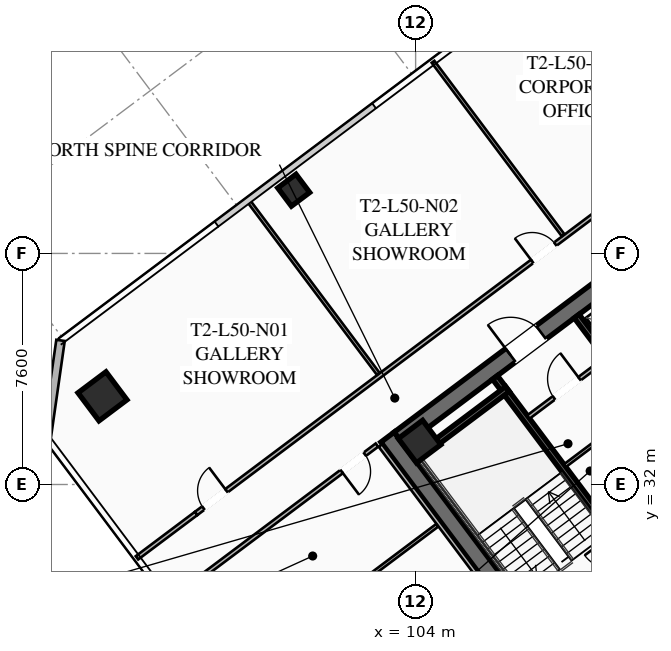
"""IFC4 building model, lengths in metres.
Left out: names, types, materials, properties, quantities, classifications, styles, units other than length and angle.
Written with IfcOpenShell. Run it as: python <this file> out.ifc"""

import sys

from ifc_helpers import new_model, si_unit, direction, frame, frame_2d, origin, origin_2d, place, context, subcontext, project, spatial, rectangle, hollow_rectangle, extrude, element, fill, save


model = new_model("IFC4")
c1 = context("Model", 3, precision=1e-05, world=origin(), true_north=direction((0.0, 1.0)))
c2 = subcontext(c1, "Body", "Model", "MODEL_VIEW")
j1 = project(units=[si_unit("LENGTHUNIT", "METRE"), si_unit("PLANEANGLEUNIT", "RADIAN")], contexts=[c1])
p1 = place(None, origin())
s1 = spatial("IfcSite", under=j1, at=p1, CompositionType="ELEMENT")
p2 = place(p1, origin())
s2 = spatial("IfcBuilding", under=s1, at=p2, CompositionType="ELEMENT")
p3 = place(p2, frame((0.0, 0.0, 185.4)))
s3 = spatial("IfcBuildingStorey", under=s2, at=p3, CompositionType="ELEMENT", Elevation=185.4)
p4 = place(p3, frame((112.436, 21.077, 0.0), z_axis=(0.0, 0.0, 1.0), x_axis=(-0.600005007985, 0.799996243986, 0.0)))
e1 = element("IfcWall", 1, at=p4, inside=s3, PredefinedType="SHEAR", context=c2, shape_type="SweptSolid", body=[
    extrude(rectangle(XDim=15.6, YDim=0.55, at=frame_2d((7.8, 0.0))), origin(), (0.0, 0.0, 1.0), 3.55),
])
p5 = place(p3, frame((103.461, 33.502, 0.0), z_axis=(0.0, 0.0, 1.0), x_axis=(0.799998054672, 0.600002593761, 0.0)))
e2 = element("IfcWall", 2, at=p5, inside=s3, PredefinedType="SHEAR", context=c2, shape_type="SweptSolid", body=[
    extrude(rectangle(XDim=15.06, YDim=0.55, at=frame_2d((7.53, 0.0))), origin(), (0.0, 0.0, 1.0), 3.55),
])
p6 = place(p5, frame((4.58, 0.0, 0.0)))
e3 = element("IfcOpeningElement", 3, at=p6, cuts=e2, PredefinedType="OPENING", context=c2, shape_type="SweptSolid", body=[
    extrude(rectangle(XDim=1.25, YDim=2.25, at=frame_2d((0.625, 1.125))), frame((0.0, 0.285, 0.0), z_axis=(0.0, -1.0, 0.0), x_axis=(1.0, 0.0, 0.0)), (0.0, 0.0, 1.0), 0.57),
])
p7 = place(p5, frame((9.63, 0.0, 0.0)))
e4 = element("IfcOpeningElement", 4, at=p7, cuts=e2, PredefinedType="OPENING", context=c2, shape_type="SweptSolid", body=[
    extrude(rectangle(XDim=1.25, YDim=2.25, at=frame_2d((0.625, 1.125))), frame((0.0, 0.285, 0.0), z_axis=(0.0, -1.0, 0.0), x_axis=(1.0, 0.0, 0.0)), (0.0, 0.0, 1.0), 0.57),
])
p8 = place(p3, frame((104.13, 33.41, 0.0), z_axis=(0.0, 0.0, 1.0), x_axis=(0.799999996291, 0.600000004945, 0.0)))
e5 = element("IfcColumn", 5, at=p8, inside=s3, PredefinedType="COLUMN", context=c2, shape_type="SweptSolid", body=[
    extrude(hollow_rectangle(XDim=1.0, YDim=1.0, WallThickness=0.04, at=origin_2d()), origin(), (0.0, 0.0, 1.0), 3.37),
])
p9 = place(p3, frame((93.7, 34.9, 0.0), z_axis=(0.0, 0.0, 1.0), x_axis=(0.799999996291, 0.600000004945, 0.0)))
e6 = element("IfcColumn", 6, at=p9, inside=s3, PredefinedType="COLUMN", context=c2, shape_type="SweptSolid", body=[
    extrude(hollow_rectangle(XDim=1.15, YDim=1.15, WallThickness=0.045, at=origin_2d()), origin(), (0.0, 0.0, 1.0), 3.37),
])
p10 = place(p3, frame((99.99, 41.68, 0.0), z_axis=(0.0, 0.0, 1.0), x_axis=(0.799999996291, 0.600000004945, 0.0)))
e7 = element("IfcColumn", 7, at=p10, inside=s3, PredefinedType="COLUMN", context=c2, shape_type="SweptSolid", body=[
    extrude(hollow_rectangle(XDim=0.75, YDim=0.75, WallThickness=0.032, at=origin_2d()), origin(), (0.0, 0.0, 1.0), 3.37),
])
p11 = place(p3, frame((91.86, 33.52, 0.0), z_axis=(0.0, 0.0, 1.0), x_axis=(0.141410847992, 0.989950994782, 0.0)))
e8 = element("IfcWall", 8, at=p11, inside=s3, PredefinedType="SOLIDWALL", context=c2, shape_type="SweptSolid", body=[
    extrude(rectangle(XDim=3.253, YDim=0.28, at=frame_2d((1.626, 0.0))), origin(), (0.0, 0.0, 1.0), 3.37),
])
p12 = place(p3, frame((111.44, 29.08, 0.0), z_axis=(0.0, 0.0, 1.0), x_axis=(-0.59999029481, 0.8000072788, 0.0)))
e9 = element("IfcWall", 9, at=p12, inside=s3, PredefinedType="SHEAR", context=c2, shape_type="SweptSolid", body=[
    extrude(rectangle(XDim=8.05, YDim=0.2, at=frame_2d((4.025, 0.0))), origin(), (0.0, 0.0, 1.0), 3.37),
])
p13 = place(p12, frame((0.45, 0.0, 0.0)))
e10 = element("IfcOpeningElement", 10, at=p13, cuts=e9, PredefinedType="OPENING", context=c2, shape_type="SweptSolid", body=[
    extrude(rectangle(XDim=1.15, YDim=2.2, at=frame_2d((0.575, 1.1))), frame((0.0, 0.11, 0.0), z_axis=(0.0, -1.0, 0.0), x_axis=(1.0, 0.0, 0.0)), (0.0, 0.0, 1.0), 0.22),
])
for number, where, z_axis, x_axis in (
    (11, (108.396, 26.922, 0.0), (0.0, 0.0, 1.0), (0.8, 0.6, 0.0)),
    (12, (103.956, 32.842, 0.0), (0.0, 0.0, 1.0), (0.8, 0.6, 0.0)),
):
    element("IfcWall", number, at=place(p3, frame(where, z_axis=z_axis, x_axis=x_axis)), inside=s3, PredefinedType="SHEAR", context=c2, shape_type="SweptSolid", body=[
        extrude(rectangle(XDim=3.83, YDim=0.2, at=frame_2d((1.915, 0.0))), origin(), (0.0, 0.0, 1.0), 3.37),
    ])
p14 = place(p3, frame((117.998, 25.936, 0.0), z_axis=(0.0, 0.0, 1.0), x_axis=(-0.600002693989, 0.799997979501, 0.0)))
e13 = element("IfcWall", 13, at=p14, inside=s3, PredefinedType="SHEAR", context=c2, shape_type="SweptSolid", body=[
    extrude(rectangle(XDim=14.5, YDim=0.2, at=frame_2d((7.25, 0.0))), origin(), (0.0, 0.0, 1.0), 3.37),
])
p15 = place(p3, frame((107.71, 34.22, 0.0), z_axis=(0.0, 0.0, 1.0), x_axis=(0.799981399002, 0.60002480053, 0.0)))
e14 = element("IfcWall", 14, at=p15, inside=s3, PredefinedType="PARTITIONING", context=c2, shape_type="SweptSolid", body=[
    extrude(rectangle(XDim=3.15, YDim=0.135, at=frame_2d((1.575, 0.0))), origin(), (0.0, 0.0, 1.0), 2.723),
])
p16 = place(p15, frame((1.05, 0.0, 0.0)))
e15 = element("IfcOpeningElement", 15, at=p16, cuts=e14, PredefinedType="OPENING", context=c2, shape_type="SweptSolid", body=[
    extrude(rectangle(XDim=1.05, YDim=2.2, at=frame_2d((0.525, 1.1))), frame((0.0, 0.077, 0.0), z_axis=(0.0, -1.0, 0.0), x_axis=(1.0, 0.0, 0.0)), (0.0, 0.0, 1.0), 0.155),
])
p17 = place(p3, frame((108.91, 32.62, 0.0), z_axis=(0.0, 0.0, 1.0), x_axis=(0.800018601094, 0.59997519774, 0.0)))
e16 = element("IfcWall", 16, at=p17, inside=s3, PredefinedType="PARTITIONING", context=c2, shape_type="SweptSolid", body=[
    extrude(rectangle(XDim=3.15, YDim=0.11, at=frame_2d((1.575, 0.0))), origin(), (0.0, 0.0, 1.0), 2.723),
])
p18 = place(p3, frame((96.778, 31.046, 0.0), z_axis=(0.0, 0.0, 1.0), x_axis=(0.799995916807, 0.600005444218, 0.0)))
e17 = element("IfcWall", 17, at=p18, inside=s3, PredefinedType="PARTITIONING", context=c2, shape_type="SweptSolid", body=[
    extrude(rectangle(XDim=28.7, YDim=0.135, at=frame_2d((14.35, 0.0))), origin(), (0.0, 0.0, 1.0), 2.723),
])
p19 = place(p18, frame((0.3, 0.0, 0.0)))
e18 = element("IfcOpeningElement", 18, at=p19, cuts=e17, PredefinedType="OPENING", context=c2, shape_type="SweptSolid", body=[
    extrude(rectangle(XDim=0.95, YDim=2.05, at=frame_2d((0.475, 1.025))), frame((0.0, 0.077, 0.0), z_axis=(0.0, -1.0, 0.0), x_axis=(1.0, 0.0, 0.0)), (0.0, 0.0, 1.0), 0.155),
])
p20 = place(p18, frame((13.82, 0.0, 0.0)))
e19 = element("IfcOpeningElement", 19, at=p20, cuts=e17, PredefinedType="OPENING", context=c2, shape_type="SweptSolid", body=[
    extrude(rectangle(XDim=0.95, YDim=2.05, at=frame_2d((0.475, 1.025))), frame((0.0, 0.077, 0.0), z_axis=(0.0, -1.0, 0.0), x_axis=(1.0, 0.0, 0.0)), (0.0, 0.0, 1.0), 0.155),
])
p21 = place(p18, frame((17.821, 0.0, 0.0)))
e20 = element("IfcOpeningElement", 20, at=p21, cuts=e17, PredefinedType="OPENING", context=c2, shape_type="SweptSolid", body=[
    extrude(rectangle(XDim=0.95, YDim=2.05, at=frame_2d((0.475, 1.025))), frame((0.0, 0.077, 0.0), z_axis=(0.0, -1.0, 0.0), x_axis=(1.0, 0.0, 0.0)), (0.0, 0.0, 1.0), 0.155),
])
p22 = place(p18, frame((27.45, 0.0, 0.0)))
e21 = element("IfcOpeningElement", 21, at=p22, cuts=e17, PredefinedType="OPENING", context=c2, shape_type="SweptSolid", body=[
    extrude(rectangle(XDim=0.95, YDim=2.05, at=frame_2d((0.475, 1.025))), frame((0.0, 0.077, 0.0), z_axis=(0.0, -1.0, 0.0), x_axis=(1.0, 0.0, 0.0)), (0.0, 0.0, 1.0), 0.155),
])
p23 = place(p3, frame((94.834, 29.588, 0.0), z_axis=(0.0, 0.0, 1.0), x_axis=(0.800012055778, 0.599983925293, 0.0)))
e22 = element("IfcWall", 22, at=p23, inside=s3, PredefinedType="PARTITIONING", context=c2, shape_type="SweptSolid", body=[
    extrude(rectangle(XDim=2.43, YDim=0.135, at=frame_2d((1.215, 0.0))), origin(), (0.0, 0.0, 1.0), 2.723),
])
for number, where, z_axis, x_axis in (
    (23, (102.77, 35.64, 0.0), (0.0, 0.0, 1.0), (-0.6, 0.8, 0.0)),
    (24, (108.85, 40.2, 0.0), (0.0, 0.0, 1.0), (-0.6, 0.8, 0.0)),
):
    element("IfcWall", number, at=place(p3, frame(where, z_axis=z_axis, x_axis=x_axis)), inside=s3, PredefinedType="PARTITIONING", context=c2, shape_type="SweptSolid", body=[
        extrude(rectangle(XDim=7.13, YDim=0.11, at=frame_2d((3.565, 0.0))), origin(), (0.0, 0.0, 1.0), 2.723),
    ])
p24 = place(p3, frame((131.6, 32.45, 0.0), z_axis=(0.0, 0.0, 1.0), x_axis=(-0.800003062365, -0.599995916825, 0.0)))
e25 = element("IfcWall", 25, at=p24, inside=s3, PredefinedType="PARTITIONING", context=c2, shape_type="SweptSolid", body=[
    extrude(rectangle(XDim=28.7, YDim=0.135, at=frame_2d((14.35, 0.0))), origin(), (0.0, 0.0, 1.0), 2.723),
])
p25 = place(p24, frame((27.37, 0.0, 0.0)))
e26 = element("IfcOpeningElement", 26, at=p25, cuts=e25, PredefinedType="OPENING", context=c2, shape_type="SweptSolid", body=[
    extrude(rectangle(XDim=0.95, YDim=2.05, at=frame_2d((0.475, 1.025))), frame((0.0, 0.077, 0.0), z_axis=(0.0, -1.0, 0.0), x_axis=(1.0, 0.0, 0.0)), (0.0, 0.0, 1.0), 0.155),
])
p26 = place(p24, frame((13.59, 0.0, 0.0)))
e27 = element("IfcOpeningElement", 27, at=p26, cuts=e25, PredefinedType="OPENING", context=c2, shape_type="SweptSolid", body=[
    extrude(rectangle(XDim=0.95, YDim=2.05, at=frame_2d((0.475, 1.025))), frame((0.0, 0.077, 0.0), z_axis=(0.0, -1.0, 0.0), x_axis=(1.0, 0.0, 0.0)), (0.0, 0.0, 1.0), 0.155),
])
p27 = place(p24, frame((9.796, 0.0, 0.0)))
e28 = element("IfcOpeningElement", 28, at=p27, cuts=e25, PredefinedType="OPENING", context=c2, shape_type="SweptSolid", body=[
    extrude(rectangle(XDim=0.95, YDim=2.05, at=frame_2d((0.475, 1.025))), frame((0.0, 0.077, 0.0), z_axis=(0.0, -1.0, 0.0), x_axis=(1.0, 0.0, 0.0)), (0.0, 0.0, 1.0), 0.155),
])
p28 = place(p24, frame((0.38, 0.0, 0.0)))
e29 = element("IfcOpeningElement", 29, at=p28, cuts=e25, PredefinedType="OPENING", context=c2, shape_type="SweptSolid", body=[
    extrude(rectangle(XDim=0.95, YDim=2.05, at=frame_2d((0.475, 1.025))), frame((0.0, 0.077, 0.0), z_axis=(0.0, -1.0, 0.0), x_axis=(1.0, 0.0, 0.0)), (0.0, 0.0, 1.0), 0.155),
])
p29 = place(p3, frame((112.104, 20.928, 0.0), z_axis=(0.0, 0.0, 1.0), x_axis=(-0.599994940075, 0.800003794918, 0.0)))
e30 = element("IfcWall", 30, at=p29, inside=s3, PredefinedType="PARTITIONING", context=c2, shape_type="SweptSolid", body=[
    extrude(rectangle(XDim=15.44, YDim=0.135, at=frame_2d((7.72, 0.0))), origin(), (0.0, 0.0, 1.0), 2.723),
])
p30 = place(p3, frame((102.728, 33.296, 0.0), z_axis=(0.0, 0.0, 1.0), x_axis=(-0.800013722153, -0.59998170336, 0.0)))
e31 = element("IfcWall", 31, at=p30, inside=s3, PredefinedType="PARTITIONING", context=c2, shape_type="SweptSolid", body=[
    extrude(rectangle(XDim=8.54, YDim=0.135, at=frame_2d((4.27, 0.0))), origin(), (0.0, 0.0, 1.0), 2.723),
])
p31 = place(p30, frame((0.5, 0.0, 0.0)))
e32 = element("IfcOpeningElement", 32, at=p31, cuts=e31, PredefinedType="OPENING", context=c2, shape_type="SweptSolid", body=[
    extrude(rectangle(XDim=0.95, YDim=2.05, at=frame_2d((0.475, 1.025))), frame((0.0, 0.077, 0.0), z_axis=(0.0, -1.0, 0.0), x_axis=(1.0, 0.0, 0.0)), (0.0, 0.0, 1.0), 0.155),
])
p32 = place(p3, frame((97.876, 25.532, 0.0), z_axis=(0.0, 0.0, 1.0), x_axis=(0.8, 0.6, 0.0)))
e33 = element("IfcWall", 33, at=p32, inside=s3, PredefinedType="PARTITIONING", context=c2, shape_type="SweptSolid", body=[
    extrude(rectangle(XDim=8.54, YDim=0.11, at=frame_2d((4.27, 0.0))), origin(), (0.0, 0.0, 1.0), 2.723),
])
p33 = place(p6, origin())
e34 = element("IfcDoor", 34, at=p33, inside=s3, OperationType="SINGLE_SWING_LEFT", PredefinedType="DOOR", context=c2, shape_type="SweptSolid", body=[
    extrude(rectangle(XDim=1.25, YDim=2.25, at=frame_2d((0.625, 1.125))), frame((0.0, 0.025, 0.0), z_axis=(0.0, -1.0, 0.0), x_axis=(1.0, 0.0, 0.0)), (0.0, 0.0, 1.0), 0.05),
])
fill(e3, e34)
p34 = place(p16, origin())
e35 = element("IfcDoor", 35, at=p34, inside=s3, OperationType="SINGLE_SWING_RIGHT", PredefinedType="DOOR", context=c2, shape_type="SweptSolid", body=[
    extrude(rectangle(XDim=1.05, YDim=2.2, at=frame_2d((0.525, 1.1))), frame((0.0, 0.025, 0.0), z_axis=(0.0, -1.0, 0.0), x_axis=(1.0, 0.0, 0.0)), (0.0, 0.0, 1.0), 0.05),
])
fill(e15, e35)
p35 = place(p19, origin())
e36 = element("IfcDoor", 36, at=p35, inside=s3, OperationType="SINGLE_SWING_RIGHT", PredefinedType="DOOR", context=c2, shape_type="SweptSolid", body=[
    extrude(rectangle(XDim=0.95, YDim=2.05, at=frame_2d((0.475, 1.025))), frame((0.0, 0.025, 0.0), z_axis=(0.0, -1.0, 0.0), x_axis=(1.0, 0.0, 0.0)), (0.0, 0.0, 1.0), 0.05),
])
fill(e18, e36)
p36 = place(p20, origin())
e37 = element("IfcDoor", 37, at=p36, inside=s3, OperationType="SINGLE_SWING_LEFT", PredefinedType="DOOR", context=c2, shape_type="SweptSolid", body=[
    extrude(rectangle(XDim=0.95, YDim=2.05, at=frame_2d((0.475, 1.025))), frame((0.0, 0.025, 0.0), z_axis=(0.0, -1.0, 0.0), x_axis=(1.0, 0.0, 0.0)), (0.0, 0.0, 1.0), 0.05),
])
fill(e19, e37)
p37 = place(p31, origin())
e38 = element("IfcDoor", 38, at=p37, inside=s3, OperationType="SINGLE_SWING_RIGHT", PredefinedType="DOOR", context=c2, shape_type="SweptSolid", body=[
    extrude(rectangle(XDim=0.95, YDim=2.05, at=frame_2d((0.475, 1.025))), frame((0.0, 0.025, 0.0), z_axis=(0.0, -1.0, 0.0), x_axis=(1.0, 0.0, 0.0)), (0.0, 0.0, 1.0), 0.05),
])
fill(e32, e38)
save(model, sys.argv[1])
